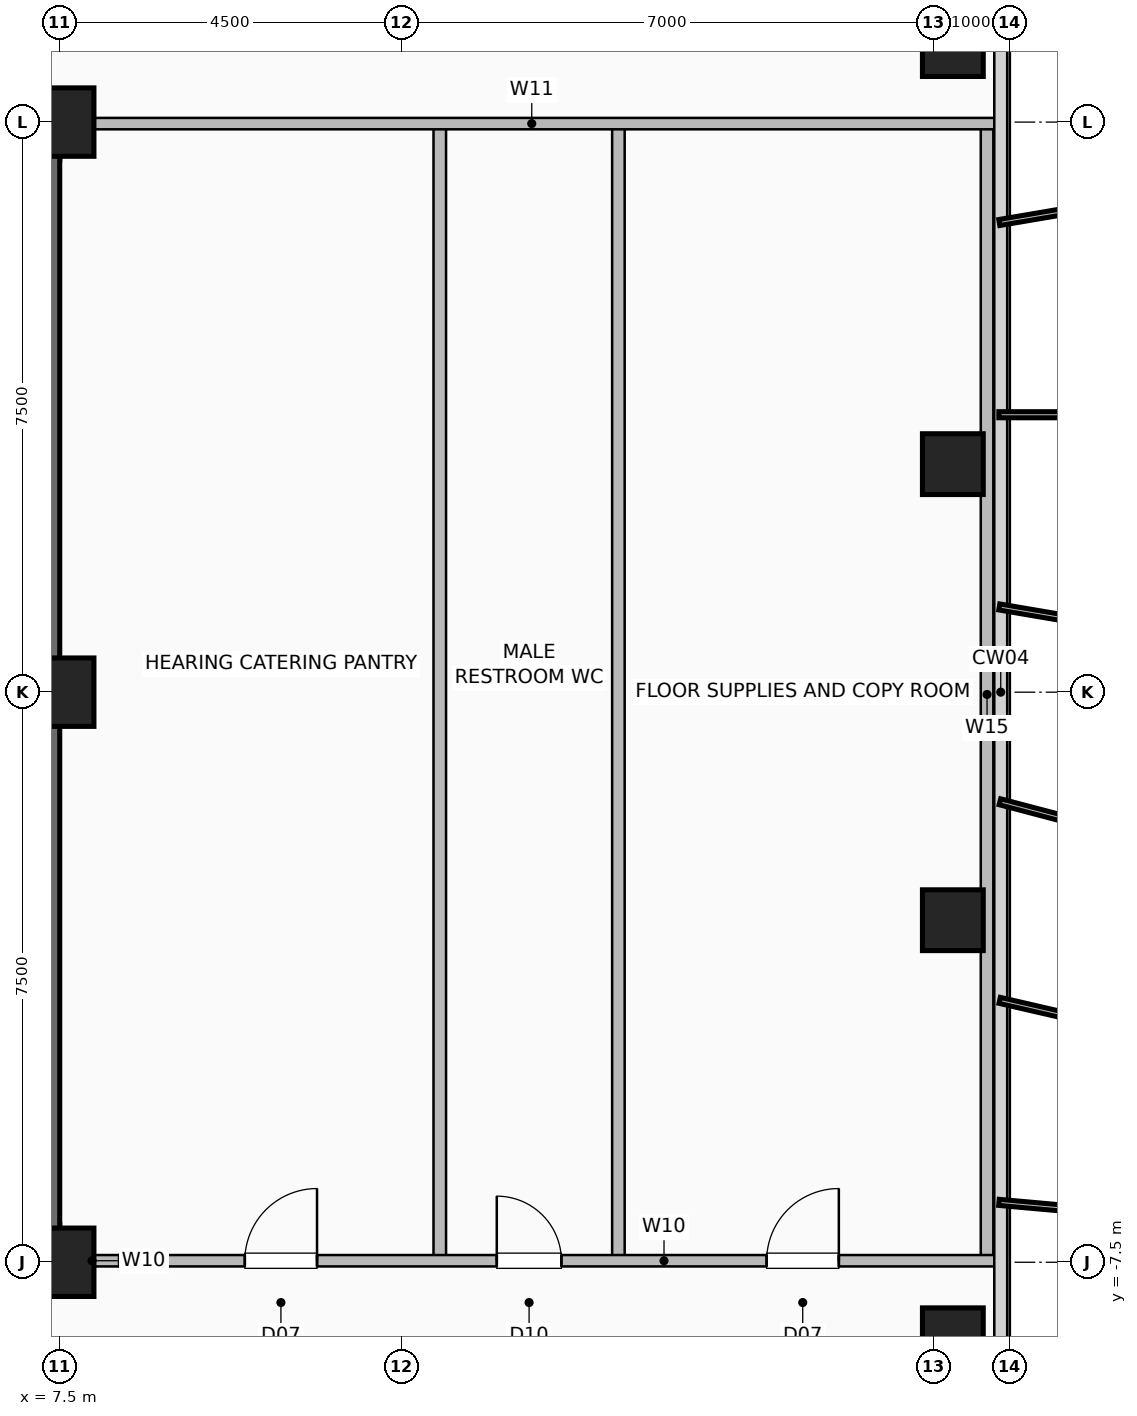
"""IFC4 building model, lengths in metres.
Left out: names, types, materials, properties, quantities, classifications, styles, units other than length and angle.
Written with IfcOpenShell. Run it as: python <this file> out.ifc"""

import sys

from ifc_helpers import new_model, si_unit, direction, frame, frame_2d, origin, origin_2d, place, context, subcontext, project, spatial, rectangle, hollow_rectangle, extrude, element, fill, save


model = new_model("IFC4")
c1 = context("Model", 3, precision=1e-05, world=origin(), true_north=direction((0.0, 1.0)))
c2 = subcontext(c1, "Body", "Model", "MODEL_VIEW")
j1 = project(units=[si_unit("LENGTHUNIT", "METRE"), si_unit("PLANEANGLEUNIT", "RADIAN")], contexts=[c1])
p1 = place(None, origin())
s1 = spatial("IfcSite", under=j1, at=p1, CompositionType="ELEMENT")
p2 = place(p1, origin())
s2 = spatial("IfcBuilding", under=s1, at=p2, CompositionType="ELEMENT")
p3 = place(p2, frame((0.0, 0.0, 184.2)))
s3 = spatial("IfcBuildingStorey", under=s2, at=p3, CompositionType="ELEMENT", Elevation=184.2)
for number, where, z_axis, x_axis in (
    (1, (7.5, -7.5, 0.0), (0.0, 0.0, 1.0), (1.0, 0.0, 0.0)),
    (2, (7.5, 0.0, 0.0), (0.0, 0.0, 1.0), (1.0, 0.0, 0.0)),
    (3, (7.5, 7.5, 0.0), (0.0, 0.0, 1.0), (1.0, 0.0, 0.0)),
):
    element("IfcColumn", number, at=place(p3, frame(where, z_axis=z_axis, x_axis=x_axis)), inside=s3, PredefinedType="COLUMN", context=c2, shape_type="SweptSolid", body=[
        extrude(hollow_rectangle(XDim=0.9, YDim=0.9, WallThickness=0.045, at=origin_2d()), origin(), (0.0, 0.0, 1.0), 3.6),
    ])
for number, where, z_axis, x_axis in (
    (4, (19.25, -8.5, 0.0), (0.0, 0.0, 1.0), (1.0, 0.0, 0.0)),
    (5, (19.25, -3.0, 0.0), (0.0, 0.0, 1.0), (1.0, 0.0, 0.0)),
    (6, (19.25, 3.0, 0.0), (0.0, 0.0, 1.0), (1.0, 0.0, 0.0)),
    (7, (19.25, 8.5, 0.0), (0.0, 0.0, 1.0), (1.0, 0.0, 0.0)),
):
    element("IfcColumn", number, at=place(p3, frame(where, z_axis=z_axis, x_axis=x_axis)), inside=s3, PredefinedType="COLUMN", context=c2, shape_type="SweptSolid", body=[
        extrude(hollow_rectangle(XDim=0.8, YDim=0.8, WallThickness=0.04, at=origin_2d()), origin(), (0.0, 0.0, 1.0), 3.6),
    ])
p4 = place(p3, frame((-7.5, -7.25, 0.0), z_axis=(0.0, 0.0, 1.0), x_axis=(1.0, 0.0, 0.0)))
e8 = element("IfcWall", 8, at=p4, inside=s3, PredefinedType="SHEAR", context=c2, shape_type="SweptSolid", body=[
    extrude(rectangle(XDim=15.0, YDim=0.5, at=frame_2d((7.5, 0.0))), origin(), (0.0, 0.0, 1.0), 3.36),
])
p5 = place(p4, frame((1.55, 0.0, 0.0)))
e9 = element("IfcOpeningElement", 9, at=p5, cuts=e8, PredefinedType="OPENING", context=c2, shape_type="SweptSolid", body=[
    extrude(rectangle(XDim=1.05, YDim=2.08, at=frame_2d((0.525, 1.04))), frame((0.0, 0.26, 0.0), z_axis=(0.0, -1.0, 0.0), x_axis=(1.0, 0.0, 0.0)), (0.0, 0.0, 1.0), 0.52),
])
p6 = place(p4, frame((12.4, 0.0, 0.0)))
e10 = element("IfcOpeningElement", 10, at=p6, cuts=e8, PredefinedType="OPENING", context=c2, shape_type="SweptSolid", body=[
    extrude(rectangle(XDim=1.05, YDim=2.08, at=frame_2d((0.525, 1.04))), frame((0.0, 0.26, 0.0), z_axis=(0.0, -1.0, 0.0), x_axis=(1.0, 0.0, 0.0)), (0.0, 0.0, 1.0), 0.52),
])
p7 = place(p4, frame((5.2, 0.0, 0.0)))
e11 = element("IfcOpeningElement", 11, at=p7, cuts=e8, PredefinedType="OPENING", context=c2, shape_type="SweptSolid", body=[
    extrude(rectangle(XDim=1.0, YDim=2.08, at=frame_2d((0.5, 1.04))), frame((0.0, 0.26, 0.0), z_axis=(0.0, -1.0, 0.0), x_axis=(1.0, 0.0, 0.0)), (0.0, 0.0, 1.0), 0.52),
])
p8 = place(p4, frame((8.65, 0.0, 0.0)))
e12 = element("IfcOpeningElement", 12, at=p8, cuts=e8, PredefinedType="OPENING", context=c2, shape_type="SweptSolid", body=[
    extrude(rectangle(XDim=1.0, YDim=2.08, at=frame_2d((0.5, 1.04))), frame((0.0, 0.26, 0.0), z_axis=(0.0, -1.0, 0.0), x_axis=(1.0, 0.0, 0.0)), (0.0, 0.0, 1.0), 0.52),
])
for number, where, z_axis, x_axis in (
    (13, (-7.5, 7.25, 0.0), (0.0, 0.0, 1.0), (1.0, 0.0, 0.0)),
    (14, (7.25, -7.5, 0.0), (0.0, 0.0, 1.0), (0.0, 1.0, 0.0)),
):
    element("IfcWall", number, at=place(p3, frame(where, z_axis=z_axis, x_axis=x_axis)), inside=s3, PredefinedType="SHEAR", context=c2, shape_type="SweptSolid", body=[
        extrude(rectangle(XDim=15.0, YDim=0.5, at=frame_2d((7.5, 0.0))), origin(), (0.0, 0.0, 1.0), 3.36),
    ])
p9 = place(p3, frame((7.45, -7.48, 0.0), z_axis=(0.0, 0.0, 1.0), x_axis=(1.0, 0.0, 0.0)))
e15 = element("IfcWall", 15, at=p9, inside=s3, PredefinedType="PARTITIONING", context=c2, shape_type="SweptSolid", body=[
    extrude(rectangle(XDim=0.95, YDim=0.15, at=frame_2d((0.475, 0.0))), origin(), (0.0, 0.0, 1.0), 3.36),
])
for number, where, z_axis, x_axis in (
    (16, (14.85, -7.48, 0.0), (0.0, 0.0, 1.0), (0.0, 1.0, 0.0)),
    (17, (12.5, -7.48, 0.0), (0.0, 0.0, 1.0), (0.0, 1.0, 0.0)),
    (18, (19.7, -7.48, 0.0), (0.0, 0.0, 1.0), (0.0, 1.0, 0.0)),
):
    element("IfcWall", number, at=place(p3, frame(where, z_axis=z_axis, x_axis=x_axis)), inside=s3, PredefinedType="PLUMBINGWALL", context=c2, shape_type="SweptSolid", body=[
        extrude(rectangle(XDim=14.9, YDim=0.165, at=frame_2d((7.45, 0.0))), origin(), (0.0, 0.0, 1.0), 3.36),
    ])
p10 = place(p3, frame((8.28, -7.48, 0.0), z_axis=(0.0, 0.0, 1.0), x_axis=(1.0, 0.0, 0.0)))
e19 = element("IfcWall", 19, at=p10, inside=s3, PredefinedType="PARTITIONING", context=c2, shape_type="SweptSolid", body=[
    extrude(rectangle(XDim=11.54, YDim=0.15, at=frame_2d((5.77, 0.0))), origin(), (0.0, 0.0, 1.0), 3.36),
])
p11 = place(p10, frame((1.655, 0.0, 0.0)))
e20 = element("IfcOpeningElement", 20, at=p11, cuts=e19, PredefinedType="OPENING", context=c2, shape_type="SweptSolid", body=[
    extrude(rectangle(XDim=0.95, YDim=2.06, at=frame_2d((0.475, 1.03))), frame((0.0, 0.085, 0.0), z_axis=(0.0, -1.0, 0.0), x_axis=(1.0, 0.0, 0.0)), (0.0, 0.0, 1.0), 0.17),
])
p12 = place(p10, frame((4.97, 0.0, 0.0)))
e21 = element("IfcOpeningElement", 21, at=p12, cuts=e19, PredefinedType="OPENING", context=c2, shape_type="SweptSolid", body=[
    extrude(rectangle(XDim=0.85, YDim=2.05, at=frame_2d((0.425, 1.025))), frame((0.0, 0.085, 0.0), z_axis=(0.0, -1.0, 0.0), x_axis=(1.0, 0.0, 0.0)), (0.0, 0.0, 1.0), 0.17),
])
p13 = place(p10, frame((8.52, 0.0, 0.0)))
e22 = element("IfcOpeningElement", 22, at=p13, cuts=e19, PredefinedType="OPENING", context=c2, shape_type="SweptSolid", body=[
    extrude(rectangle(XDim=0.95, YDim=2.06, at=frame_2d((0.475, 1.03))), frame((0.0, 0.085, 0.0), z_axis=(0.0, -1.0, 0.0), x_axis=(1.0, 0.0, 0.0)), (0.0, 0.0, 1.0), 0.17),
])
p14 = place(p3, frame((7.6, 7.48, 0.0), z_axis=(0.0, 0.0, 1.0), x_axis=(1.0, 0.0, 0.0)))
e23 = element("IfcWall", 23, at=p14, inside=s3, PredefinedType="PARTITIONING", context=c2, shape_type="SweptSolid", body=[
    extrude(rectangle(XDim=12.22, YDim=0.15, at=frame_2d((6.11, 0.0))), origin(), (0.0, 0.0, 1.0), 3.36),
])
p15 = place(p11, origin())
e24 = element("IfcDoor", 24, at=p15, inside=s3, OperationType="SINGLE_SWING_RIGHT", PredefinedType="DOOR", context=c2, shape_type="SweptSolid", body=[
    extrude(rectangle(XDim=0.95, YDim=2.06, at=frame_2d((0.475, 1.03))), frame((0.0, 0.025, 0.0), z_axis=(0.0, -1.0, 0.0), x_axis=(1.0, 0.0, 0.0)), (0.0, 0.0, 1.0), 0.05),
])
fill(e20, e24)
p16 = place(p12, origin())
e25 = element("IfcDoor", 25, at=p16, inside=s3, OperationType="SINGLE_SWING_LEFT", PredefinedType="DOOR", context=c2, shape_type="SweptSolid", body=[
    extrude(rectangle(XDim=0.85, YDim=2.05, at=frame_2d((0.425, 1.025))), frame((0.0, 0.025, 0.0), z_axis=(0.0, -1.0, 0.0), x_axis=(1.0, 0.0, 0.0)), (0.0, 0.0, 1.0), 0.05),
])
fill(e21, e25)
p17 = place(p13, origin())
e26 = element("IfcDoor", 26, at=p17, inside=s3, OperationType="SINGLE_SWING_RIGHT", PredefinedType="DOOR", context=c2, shape_type="SweptSolid", body=[
    extrude(rectangle(XDim=0.95, YDim=2.06, at=frame_2d((0.475, 1.03))), frame((0.0, 0.025, 0.0), z_axis=(0.0, -1.0, 0.0), x_axis=(1.0, 0.0, 0.0)), (0.0, 0.0, 1.0), 0.05),
])
fill(e22, e26)
save(model, sys.argv[1])
